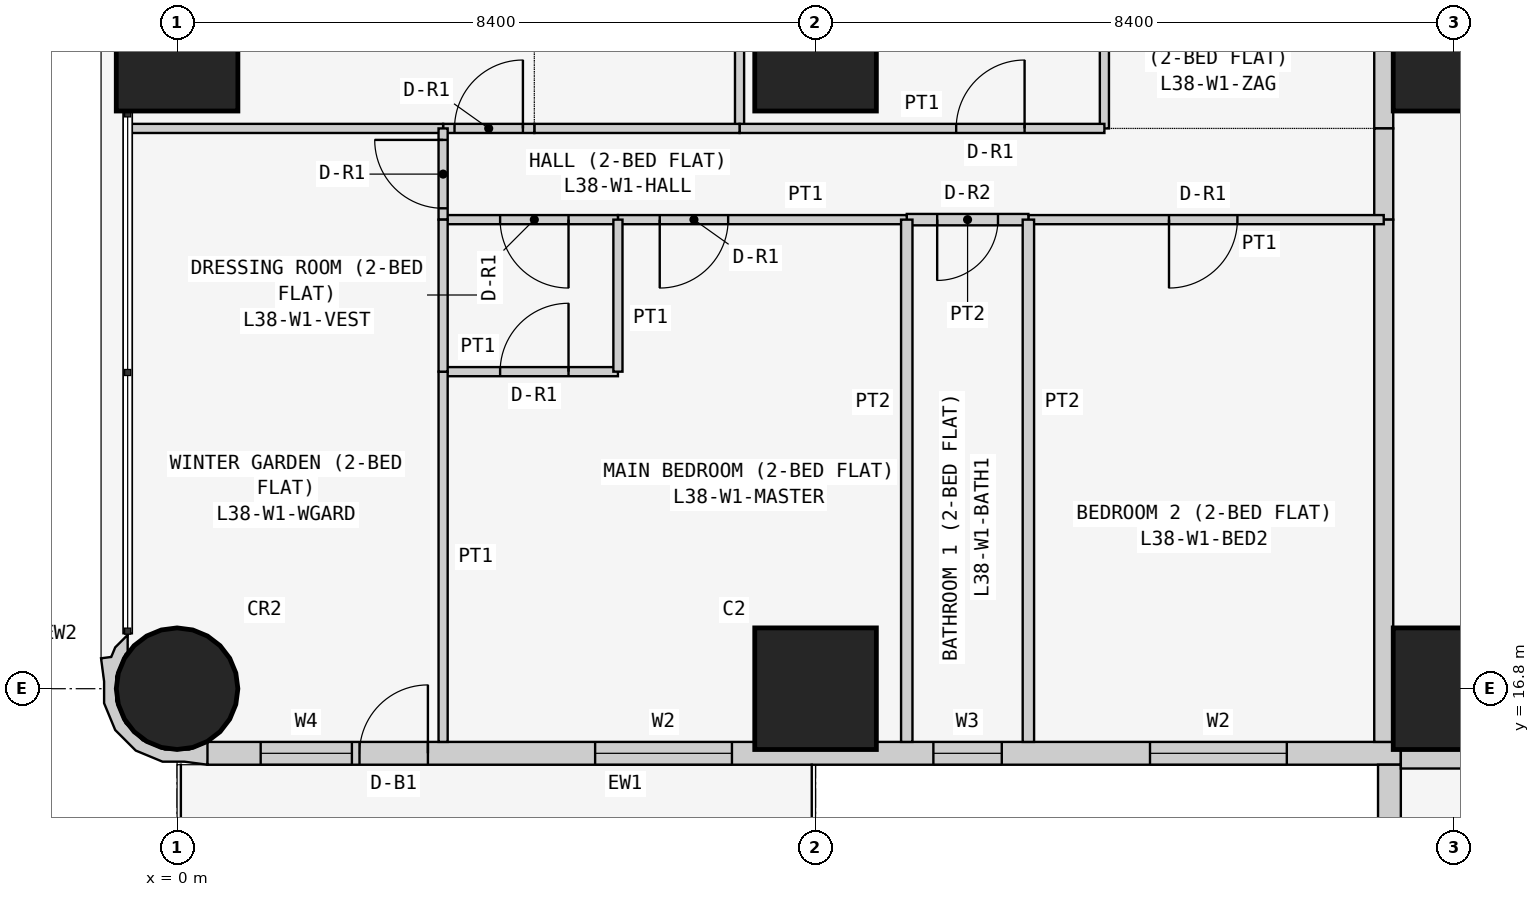
"""IFC4 building model, lengths in metres.
Left out: names, types, materials, properties, quantities, classifications, styles, units other than length and angle.
Written with IfcOpenShell. Run it as: python <this file> out.ifc"""

import sys

from ifc_helpers import new_model, si_unit, direction, frame, frame_2d, origin, origin_2d, place, context, subcontext, project, spatial, polyline, rectangle, circle, outline, extrude, element, fill, save


model = new_model("IFC4")
c1 = context("Model", 3, precision=1e-05, world=origin(), true_north=direction((0.0, 1.0)))
c2 = subcontext(c1, "Body", "Model", "MODEL_VIEW")
j1 = project(units=[si_unit("LENGTHUNIT", "METRE"), si_unit("PLANEANGLEUNIT", "RADIAN")], contexts=[c1])
p1 = place(None, origin())
s1 = spatial("IfcSite", under=j1, at=p1, CompositionType="ELEMENT")
p2 = place(p1, origin())
s2 = spatial("IfcBuilding", under=s1, at=p2, CompositionType="ELEMENT")
p3 = place(p2, frame((0.0, 0.0, 148.5)))
s3 = spatial("IfcBuildingStorey", under=s2, at=p3, CompositionType="ELEMENT", Elevation=148.5)
p4 = place(p3, frame((0.0, 16.8, 0.0), z_axis=(0.0, 0.0, 1.0), x_axis=(1.0, 0.0, 0.0)))
e1 = element("IfcColumn", 1, at=p4, inside=s3, PredefinedType="COLUMN", context=c2, shape_type="SweptSolid", body=[
    extrude(circle(Radius=0.8, at=origin_2d()), origin(), (0.0, 0.0, 1.0), 3.6),
])
for number, where, z_axis, x_axis in (
    (2, (0.0, 25.2, 0.0), (0.0, 0.0, 1.0), (1.0, 0.0, 0.0)),
    (3, (8.4, 16.8, 0.0), (0.0, 0.0, 1.0), (1.0, 0.0, 0.0)),
    (4, (8.4, 25.2, 0.0), (0.0, 0.0, 1.0), (1.0, 0.0, 0.0)),
    (5, (16.8, 16.8, 0.0), (0.0, 0.0, 1.0), (1.0, 0.0, 0.0)),
    (6, (16.8, 25.2, 0.0), (0.0, 0.0, 1.0), (1.0, 0.0, 0.0)),
):
    element("IfcColumn", number, at=place(p3, frame(where, z_axis=z_axis, x_axis=x_axis)), inside=s3, PredefinedType="COLUMN", context=c2, shape_type="SweptSolid", body=[
        extrude(rectangle(XDim=1.6, YDim=1.6, at=origin_2d()), origin(), (0.0, 0.0, 1.0), 3.6),
    ])
p5 = place(p3, frame((0.4, 15.95, 0.0), z_axis=(0.0, 0.0, 1.0), x_axis=(1.0, 0.0, 0.0)))
e7 = element("IfcWall", 7, at=p5, inside=s3, PredefinedType="SOLIDWALL", context=c2, shape_type="SweptSolid", body=[
    extrude(rectangle(XDim=15.7, YDim=0.3, at=frame_2d((7.85, 0.0))), origin(), (0.0, 0.0, 1.0), 3.45),
])
p6 = place(p5, frame((12.4, 0.0, 0.9)))
e8 = element("IfcOpeningElement", 8, at=p6, cuts=e7, PredefinedType="OPENING", context=c2, shape_type="SweptSolid", body=[
    extrude(rectangle(XDim=1.8, YDim=1.5, at=frame_2d((0.9, 0.75))), frame((0.0, 0.16, 0.0), z_axis=(0.0, -1.0, 0.0), x_axis=(1.0, 0.0, 0.0)), (0.0, 0.0, 1.0), 0.32),
])
p7 = place(p5, frame((9.55, 0.0, 1.5)))
e9 = element("IfcOpeningElement", 9, at=p7, cuts=e7, PredefinedType="OPENING", context=c2, shape_type="SweptSolid", body=[
    extrude(rectangle(XDim=0.9, YDim=0.7, at=frame_2d((0.45, 0.35))), frame((0.0, 0.16, 0.0), z_axis=(0.0, -1.0, 0.0), x_axis=(1.0, 0.0, 0.0)), (0.0, 0.0, 1.0), 0.32),
])
p8 = place(p5, frame((5.1, 0.0, 0.9)))
e10 = element("IfcOpeningElement", 10, at=p8, cuts=e7, PredefinedType="OPENING", context=c2, shape_type="SweptSolid", body=[
    extrude(rectangle(XDim=1.8, YDim=1.5, at=frame_2d((0.9, 0.75))), frame((0.0, 0.16, 0.0), z_axis=(0.0, -1.0, 0.0), x_axis=(1.0, 0.0, 0.0)), (0.0, 0.0, 1.0), 0.32),
])
p9 = place(p5, frame((2.0, 0.0, 0.0)))
e11 = element("IfcOpeningElement", 11, at=p9, cuts=e7, PredefinedType="OPENING", context=c2, shape_type="SweptSolid", body=[
    extrude(rectangle(XDim=0.9, YDim=2.4, at=frame_2d((0.45, 1.2))), frame((0.0, 0.16, 0.0), z_axis=(0.0, -1.0, 0.0), x_axis=(1.0, 0.0, 0.0)), (0.0, 0.0, 1.0), 0.32),
])
p10 = place(p5, frame((0.7, 0.0, 0.9)))
e12 = element("IfcOpeningElement", 12, at=p10, cuts=e7, PredefinedType="OPENING", context=c2, shape_type="SweptSolid", body=[
    extrude(rectangle(XDim=1.2, YDim=1.5, at=frame_2d((0.6, 0.75))), frame((0.0, 0.16, 0.0), z_axis=(0.0, -1.0, 0.0), x_axis=(1.0, 0.0, 0.0)), (0.0, 0.0, 1.0), 0.32),
])
p11 = place(p3, frame((15.95, 15.8, 0.0), z_axis=(0.0, 0.0, 1.0), x_axis=(0.0, -1.0, 0.0)))
e13 = element("IfcWall", 13, at=p11, inside=s3, PredefinedType="SOLIDWALL", context=c2, shape_type="SweptSolid", body=[
    extrude(rectangle(XDim=7.0, YDim=0.3, at=frame_2d((3.5, 0.0))), origin(), (0.0, 0.0, 1.0), 3.45),
])
p12 = place(p11, frame((1.5, 0.0, 0.9)))
e14 = element("IfcOpeningElement", 14, at=p12, cuts=e13, PredefinedType="OPENING", context=c2, shape_type="SweptSolid", body=[
    extrude(rectangle(XDim=2.4, YDim=1.5, at=frame_2d((1.2, 0.75))), frame((0.0, 0.16, 0.0), z_axis=(0.0, -1.0, 0.0), x_axis=(1.0, 0.0, 0.0)), (0.0, 0.0, 1.0), 0.32),
])
p13 = place(p11, frame((5.05, 0.0, 0.9)))
e15 = element("IfcOpeningElement", 15, at=p13, cuts=e13, PredefinedType="OPENING", context=c2, shape_type="SweptSolid", body=[
    extrude(rectangle(XDim=1.2, YDim=1.5, at=frame_2d((0.6, 0.75))), frame((0.0, 0.16, 0.0), z_axis=(0.0, -1.0, 0.0), x_axis=(1.0, 0.0, 0.0)), (0.0, 0.0, 1.0), 0.32),
])
p14 = place(p3, frame((-0.595, 17.448, 0.0), z_axis=(0.0, 0.0, 1.0), x_axis=(-0.93923434088, -0.343276641956, 0.0)))
e16 = element("IfcWall", 16, at=p14, inside=s3, PredefinedType="SOLIDWALL", context=c2, shape_type="SweptSolid", body=[
    extrude(outline(polyline([(-0.369, 1.89), (-0.509, 1.621), (-0.491, 1.614), (-0.479, 1.609), (-0.211, 1.62), (0.088, 1.511), (0.323, 1.295), (0.457, 1.006), (0.47, 0.688), (0.361, 0.389), (0.146, 0.154), (0.108, 0.137), (0.031, -0.075), (0.241, 0.023), (0.334, 0.124), (0.465, 0.094), (0.532, 0.393), (0.631, 0.663), (0.614, 1.045), (0.453, 1.391), (0.172, 1.649), (-0.098, 1.748), (-0.369, 1.89)])), origin(), (0.0, 0.0, 1.0), 3.45),
])
p15 = place(p3, frame((22.971, 15.875, 0.0), z_axis=(0.0, 0.0, 1.0), x_axis=(-1.0, 0.0, 0.0)))
e17 = element("IfcWall", 17, at=p15, inside=s3, PredefinedType="PARTITIONING", context=c2, shape_type="SweptSolid", body=[
    extrude(rectangle(XDim=6.871, YDim=0.25, at=frame_2d((3.436, 0.0))), origin(), (0.0, 0.0, 1.0), 3.45),
])
p16 = place(p3, frame((15.875, 24.171, 0.0), z_axis=(0.0, 0.0, 1.0), x_axis=(0.0, 1.0, 0.0)))
e18 = element("IfcWall", 18, at=p16, inside=s3, PredefinedType="PARTITIONING", context=c2, shape_type="SweptSolid", body=[
    extrude(rectangle(XDim=5.229, YDim=0.25, at=frame_2d((2.615, 0.0))), origin(), (0.0, 0.0, 1.0), 3.45),
])
p17 = place(p16, frame((2.129, 0.0, 0.0)))
e19 = element("IfcOpeningElement", 19, at=p17, cuts=e18, PredefinedType="OPENING", context=c2, shape_type="SweptSolid", body=[
    extrude(rectangle(XDim=1.0, YDim=2.1, at=frame_2d((0.5, 1.05))), frame((0.0, 0.135, 0.0), z_axis=(0.0, -1.0, 0.0), x_axis=(1.0, 0.0, 0.0)), (0.0, 0.0, 1.0), 0.27),
])
p18 = place(p3, frame((15.875, 22.971, 0.0), z_axis=(0.0, 0.0, 1.0), x_axis=(0.0, 1.0, 0.0)))
e20 = element("IfcWall", 20, at=p18, inside=s3, PredefinedType="PARTITIONING", context=c2, shape_type="SweptSolid", body=[
    extrude(rectangle(XDim=1.2, YDim=0.25, at=frame_2d((0.6, 0.0))), origin(), (0.0, 0.0, 1.0), 3.45),
])
p19 = place(p3, frame((15.875, 16.1, 0.0), z_axis=(0.0, 0.0, 1.0), x_axis=(0.0, 1.0, 0.0)))
e21 = element("IfcWall", 21, at=p19, inside=s3, PredefinedType="PARTITIONING", context=c2, shape_type="SweptSolid", body=[
    extrude(rectangle(XDim=6.871, YDim=0.25, at=frame_2d((3.436, 0.0))), origin(), (0.0, 0.0, 1.0), 3.45),
])
for number, where, z_axis, x_axis in (
    (22, (12.2, 29.4, 0.0), (0.0, 0.0, 1.0), (0.0, -1.0, 0.0)),
    (23, (7.4, 29.4, 0.0), (0.0, 0.0, 1.0), (0.0, -1.0, 0.0)),
):
    element("IfcWall", number, at=place(p3, frame(where, z_axis=z_axis, x_axis=x_axis)), inside=s3, PredefinedType="PARTITIONING", context=c2, shape_type="SweptSolid", body=[
        extrude(rectangle(XDim=5.229, YDim=0.12, at=frame_2d((2.615, 0.0))), origin(), (0.0, 0.0, 1.0), 3.45),
    ])
p20 = place(p3, frame((7.4, 24.171, 0.0), z_axis=(0.0, 0.0, 1.0), x_axis=(1.0, 0.0, 0.0)))
e24 = element("IfcWall", 24, at=p20, inside=s3, PredefinedType="PARTITIONING", context=c2, shape_type="SweptSolid", body=[
    extrude(rectangle(XDim=4.8, YDim=0.12, at=frame_2d((2.4, 0.0))), origin(), (0.0, 0.0, 1.0), 3.45),
])
p21 = place(p20, frame((2.85, 0.0, 0.0)))
e25 = element("IfcOpeningElement", 25, at=p21, cuts=e24, PredefinedType="OPENING", context=c2, shape_type="SweptSolid", body=[
    extrude(rectangle(XDim=0.9, YDim=2.1, at=frame_2d((0.45, 1.05))), frame((0.0, 0.07, 0.0), z_axis=(0.0, -1.0, 0.0), x_axis=(1.0, 0.0, 0.0)), (0.0, 0.0, 1.0), 0.14),
])
p22 = place(p3, frame((4.7, 24.171, 0.0), z_axis=(0.0, 0.0, 1.0), x_axis=(1.0, 0.0, 0.0)))
e26 = element("IfcWall", 26, at=p22, inside=s3, PredefinedType="PARTITIONING", context=c2, shape_type="SweptSolid", body=[
    extrude(rectangle(XDim=2.7, YDim=0.12, at=frame_2d((1.35, 0.0))), origin(), (0.0, 0.0, 1.0), 3.45),
])
p23 = place(p3, frame((3.5, 24.171, 0.0), z_axis=(0.0, 0.0, 1.0), x_axis=(1.0, 0.0, 0.0)))
e27 = element("IfcWall", 27, at=p23, inside=s3, PredefinedType="PARTITIONING", context=c2, shape_type="SweptSolid", body=[
    extrude(rectangle(XDim=1.2, YDim=0.12, at=frame_2d((0.6, 0.0))), origin(), (0.0, 0.0, 1.0), 3.45),
])
p24 = place(p23, frame((0.15, 0.0, 0.0)))
e28 = element("IfcOpeningElement", 28, at=p24, cuts=e27, PredefinedType="OPENING", context=c2, shape_type="SweptSolid", body=[
    extrude(rectangle(XDim=0.9, YDim=2.1, at=frame_2d((0.45, 1.05))), frame((0.0, 0.07, 0.0), z_axis=(0.0, -1.0, 0.0), x_axis=(1.0, 0.0, 0.0)), (0.0, 0.0, 1.0), 0.14),
])
p25 = place(p3, frame((-0.65, 24.171, 0.0), z_axis=(0.0, 0.0, 1.0), x_axis=(1.0, 0.0, 0.0)))
e29 = element("IfcWall", 29, at=p25, inside=s3, PredefinedType="PARTITIONING", context=c2, shape_type="SweptSolid", body=[
    extrude(rectangle(XDim=4.15, YDim=0.12, at=frame_2d((2.075, 0.0))), origin(), (0.0, 0.0, 1.0), 3.45),
])
p26 = place(p3, frame((11.2, 22.971, 0.0), z_axis=(0.0, 0.0, 1.0), x_axis=(1.0, 0.0, 0.0)))
e30 = element("IfcWall", 30, at=p26, inside=s3, PredefinedType="PARTITIONING", context=c2, shape_type="SweptSolid", body=[
    extrude(rectangle(XDim=4.675, YDim=0.12, at=frame_2d((2.337, 0.0))), origin(), (0.0, 0.0, 1.0), 3.45),
])
p27 = place(p26, frame((1.85, 0.0, 0.0)))
e31 = element("IfcOpeningElement", 31, at=p27, cuts=e30, PredefinedType="OPENING", context=c2, shape_type="SweptSolid", body=[
    extrude(rectangle(XDim=0.9, YDim=2.1, at=frame_2d((0.45, 1.05))), frame((0.0, 0.07, 0.0), z_axis=(0.0, -1.0, 0.0), x_axis=(1.0, 0.0, 0.0)), (0.0, 0.0, 1.0), 0.14),
])
p28 = place(p3, frame((9.6, 22.971, 0.0), z_axis=(0.0, 0.0, 1.0), x_axis=(1.0, 0.0, 0.0)))
e32 = element("IfcWall", 32, at=p28, inside=s3, PredefinedType="PARTITIONING", context=c2, shape_type="SweptSolid", body=[
    extrude(rectangle(XDim=1.6, YDim=0.15, at=frame_2d((0.8, 0.0))), origin(), (0.0, 0.0, 1.0), 3.45),
])
p29 = place(p28, frame((0.4, 0.0, 0.0)))
e33 = element("IfcOpeningElement", 33, at=p29, cuts=e32, PredefinedType="OPENING", context=c2, shape_type="SweptSolid", body=[
    extrude(rectangle(XDim=0.8, YDim=2.1, at=frame_2d((0.4, 1.05))), frame((0.0, 0.085, 0.0), z_axis=(0.0, -1.0, 0.0), x_axis=(1.0, 0.0, 0.0)), (0.0, 0.0, 1.0), 0.17),
])
p30 = place(p3, frame((5.8, 22.971, 0.0), z_axis=(0.0, 0.0, 1.0), x_axis=(1.0, 0.0, 0.0)))
e34 = element("IfcWall", 34, at=p30, inside=s3, PredefinedType="PARTITIONING", context=c2, shape_type="SweptSolid", body=[
    extrude(rectangle(XDim=3.8, YDim=0.12, at=frame_2d((1.9, 0.0))), origin(), (0.0, 0.0, 1.0), 3.45),
])
p31 = place(p30, frame((0.55, 0.0, 0.0)))
e35 = element("IfcOpeningElement", 35, at=p31, cuts=e34, PredefinedType="OPENING", context=c2, shape_type="SweptSolid", body=[
    extrude(rectangle(XDim=0.9, YDim=2.1, at=frame_2d((0.45, 1.05))), frame((0.0, 0.07, 0.0), z_axis=(0.0, -1.0, 0.0), x_axis=(1.0, 0.0, 0.0)), (0.0, 0.0, 1.0), 0.14),
])
p32 = place(p3, frame((3.5, 22.971, 0.0), z_axis=(0.0, 0.0, 1.0), x_axis=(1.0, 0.0, 0.0)))
e36 = element("IfcWall", 36, at=p32, inside=s3, PredefinedType="PARTITIONING", context=c2, shape_type="SweptSolid", body=[
    extrude(rectangle(XDim=2.3, YDim=0.12, at=frame_2d((1.15, 0.0))), origin(), (0.0, 0.0, 1.0), 3.45),
])
p33 = place(p32, frame((0.75, 0.0, 0.0)))
e37 = element("IfcOpeningElement", 37, at=p33, cuts=e36, PredefinedType="OPENING", context=c2, shape_type="SweptSolid", body=[
    extrude(rectangle(XDim=0.9, YDim=2.1, at=frame_2d((0.45, 1.05))), frame((0.0, 0.07, 0.0), z_axis=(0.0, -1.0, 0.0), x_axis=(1.0, 0.0, 0.0)), (0.0, 0.0, 1.0), 0.14),
])
p34 = place(p3, frame((3.5, 24.171, 0.0), z_axis=(0.0, 0.0, 1.0), x_axis=(0.0, -1.0, 0.0)))
e38 = element("IfcWall", 38, at=p34, inside=s3, PredefinedType="PARTITIONING", context=c2, shape_type="SweptSolid", body=[
    extrude(rectangle(XDim=1.2, YDim=0.12, at=frame_2d((0.6, 0.0))), origin(), (0.0, 0.0, 1.0), 3.45),
])
p35 = place(p34, frame((0.151, 0.0, 0.0)))
e39 = element("IfcOpeningElement", 39, at=p35, cuts=e38, PredefinedType="OPENING", context=c2, shape_type="SweptSolid", body=[
    extrude(rectangle(XDim=0.9, YDim=2.1, at=frame_2d((0.45, 1.05))), frame((0.0, 0.07, 0.0), z_axis=(0.0, -1.0, 0.0), x_axis=(1.0, 0.0, 0.0)), (0.0, 0.0, 1.0), 0.14),
])
for number, where, z_axis, x_axis in (
    (40, (11.2, 22.971, 0.0), (0.0, 0.0, 1.0), (0.0, -1.0, 0.0)),
    (41, (9.6, 22.971, 0.0), (0.0, 0.0, 1.0), (0.0, -1.0, 0.0)),
):
    element("IfcWall", number, at=place(p3, frame(where, z_axis=z_axis, x_axis=x_axis)), inside=s3, PredefinedType="PARTITIONING", context=c2, shape_type="SweptSolid", body=[
        extrude(rectangle(XDim=6.871, YDim=0.15, at=frame_2d((3.436, 0.0))), origin(), (0.0, 0.0, 1.0), 3.45),
    ])
p36 = place(p3, frame((3.5, 20.971, 0.0), z_axis=(0.0, 0.0, 1.0), x_axis=(1.0, 0.0, 0.0)))
e42 = element("IfcWall", 42, at=p36, inside=s3, PredefinedType="PARTITIONING", context=c2, shape_type="SweptSolid", body=[
    extrude(rectangle(XDim=2.3, YDim=0.12, at=frame_2d((1.15, 0.0))), origin(), (0.0, 0.0, 1.0), 3.45),
])
p37 = place(p36, frame((0.75, 0.0, 0.0)))
e43 = element("IfcOpeningElement", 43, at=p37, cuts=e42, PredefinedType="OPENING", context=c2, shape_type="SweptSolid", body=[
    extrude(rectangle(XDim=0.9, YDim=2.1, at=frame_2d((0.45, 1.05))), frame((0.0, 0.07, 0.0), z_axis=(0.0, -1.0, 0.0), x_axis=(1.0, 0.0, 0.0)), (0.0, 0.0, 1.0), 0.14),
])
p38 = place(p3, frame((5.8, 20.971, 0.0), z_axis=(0.0, 0.0, 1.0), x_axis=(0.0, 1.0, 0.0)))
e44 = element("IfcWall", 44, at=p38, inside=s3, PredefinedType="PARTITIONING", context=c2, shape_type="SweptSolid", body=[
    extrude(rectangle(XDim=2.0, YDim=0.12, at=frame_2d((1.0, 0.0))), origin(), (0.0, 0.0, 1.0), 3.45),
])
p39 = place(p3, frame((3.5, 16.1, 0.0), z_axis=(0.0, 0.0, 1.0), x_axis=(0.0, 1.0, 0.0)))
e45 = element("IfcWall", 45, at=p39, inside=s3, PredefinedType="PARTITIONING", context=c2, shape_type="SweptSolid", body=[
    extrude(rectangle(XDim=4.871, YDim=0.12, at=frame_2d((2.436, 0.0))), origin(), (0.0, 0.0, 1.0), 3.45),
])
p40 = place(p3, frame((3.5, 22.971, 0.0), z_axis=(0.0, 0.0, 1.0), x_axis=(0.0, -1.0, 0.0)))
e46 = element("IfcWall", 46, at=p40, inside=s3, PredefinedType="PARTITIONING", context=c2, shape_type="SweptSolid", body=[
    extrude(rectangle(XDim=2.0, YDim=0.12, at=frame_2d((1.0, 0.0))), origin(), (0.0, 0.0, 1.0), 3.45),
])
p41 = place(p6, origin())
e47 = element("IfcWindow", 47, at=p41, inside=s3, PartitioningType="SINGLE_PANEL", PredefinedType="WINDOW", context=c2, shape_type="SweptSolid", body=[
    extrude(rectangle(XDim=1.8, YDim=1.5, at=frame_2d((0.9, 0.75))), frame((0.0, 0.03, 0.0), z_axis=(0.0, -1.0, 0.0), x_axis=(1.0, 0.0, 0.0)), (0.0, 0.0, 1.0), 0.06),
])
fill(e8, e47)
p42 = place(p7, origin())
e48 = element("IfcWindow", 48, at=p42, inside=s3, PartitioningType="SINGLE_PANEL", PredefinedType="WINDOW", context=c2, shape_type="SweptSolid", body=[
    extrude(rectangle(XDim=0.9, YDim=0.7, at=frame_2d((0.45, 0.35))), frame((0.0, 0.03, 0.0), z_axis=(0.0, -1.0, 0.0), x_axis=(1.0, 0.0, 0.0)), (0.0, 0.0, 1.0), 0.06),
])
fill(e9, e48)
p43 = place(p8, origin())
e49 = element("IfcWindow", 49, at=p43, inside=s3, PartitioningType="SINGLE_PANEL", PredefinedType="WINDOW", context=c2, shape_type="SweptSolid", body=[
    extrude(rectangle(XDim=1.8, YDim=1.5, at=frame_2d((0.9, 0.75))), frame((0.0, 0.03, 0.0), z_axis=(0.0, -1.0, 0.0), x_axis=(1.0, 0.0, 0.0)), (0.0, 0.0, 1.0), 0.06),
])
fill(e10, e49)
p44 = place(p9, origin())
e50 = element("IfcDoor", 50, at=p44, inside=s3, OperationType="SINGLE_SWING_RIGHT", PredefinedType="DOOR", context=c2, shape_type="SweptSolid", body=[
    extrude(rectangle(XDim=0.9, YDim=2.4, at=frame_2d((0.45, 1.2))), frame((0.0, 0.025, 0.0), z_axis=(0.0, -1.0, 0.0), x_axis=(1.0, 0.0, 0.0)), (0.0, 0.0, 1.0), 0.05),
])
fill(e11, e50)
p45 = place(p10, origin())
e51 = element("IfcWindow", 51, at=p45, inside=s3, PartitioningType="SINGLE_PANEL", PredefinedType="WINDOW", context=c2, shape_type="SweptSolid", body=[
    extrude(rectangle(XDim=1.2, YDim=1.5, at=frame_2d((0.6, 0.75))), frame((0.0, 0.03, 0.0), z_axis=(0.0, -1.0, 0.0), x_axis=(1.0, 0.0, 0.0)), (0.0, 0.0, 1.0), 0.06),
])
fill(e12, e51)
p46 = place(p21, origin())
e52 = element("IfcDoor", 52, at=p46, inside=s3, OperationType="SINGLE_SWING_RIGHT", PredefinedType="DOOR", context=c2, shape_type="SweptSolid", body=[
    extrude(rectangle(XDim=0.9, YDim=2.1, at=frame_2d((0.45, 1.05))), frame((0.0, 0.025, 0.0), z_axis=(0.0, -1.0, 0.0), x_axis=(1.0, 0.0, 0.0)), (0.0, 0.0, 1.0), 0.05),
])
fill(e25, e52)
p47 = place(p24, origin())
e53 = element("IfcDoor", 53, at=p47, inside=s3, OperationType="SINGLE_SWING_RIGHT", PredefinedType="DOOR", context=c2, shape_type="SweptSolid", body=[
    extrude(rectangle(XDim=0.9, YDim=2.1, at=frame_2d((0.45, 1.05))), frame((0.0, 0.025, 0.0), z_axis=(0.0, -1.0, 0.0), x_axis=(1.0, 0.0, 0.0)), (0.0, 0.0, 1.0), 0.05),
])
fill(e28, e53)
p48 = place(p27, frame((0.9, 0.0, 0.0), z_axis=(0.0, 0.0, 1.0), x_axis=(-1.0, 0.0, 0.0)))
e54 = element("IfcDoor", 54, at=p48, inside=s3, OperationType="SINGLE_SWING_RIGHT", PredefinedType="DOOR", context=c2, shape_type="SweptSolid", body=[
    extrude(rectangle(XDim=0.9, YDim=2.1, at=frame_2d((0.45, 1.05))), frame((0.0, 0.025, 0.0), z_axis=(0.0, -1.0, 0.0), x_axis=(1.0, 0.0, 0.0)), (0.0, 0.0, 1.0), 0.05),
])
fill(e31, e54)
p49 = place(p29, frame((0.8, 0.0, 0.0), z_axis=(0.0, 0.0, 1.0), x_axis=(-1.0, 0.0, 0.0)))
e55 = element("IfcDoor", 55, at=p49, inside=s3, OperationType="SINGLE_SWING_RIGHT", PredefinedType="DOOR", context=c2, shape_type="SweptSolid", body=[
    extrude(rectangle(XDim=0.8, YDim=2.1, at=frame_2d((0.4, 1.05))), frame((0.0, 0.025, 0.0), z_axis=(0.0, -1.0, 0.0), x_axis=(1.0, 0.0, 0.0)), (0.0, 0.0, 1.0), 0.05),
])
fill(e33, e55)
p50 = place(p31, frame((0.9, 0.0, 0.0), z_axis=(0.0, 0.0, 1.0), x_axis=(-1.0, 0.0, 0.0)))
e56 = element("IfcDoor", 56, at=p50, inside=s3, OperationType="SINGLE_SWING_RIGHT", PredefinedType="DOOR", context=c2, shape_type="SweptSolid", body=[
    extrude(rectangle(XDim=0.9, YDim=2.1, at=frame_2d((0.45, 1.05))), frame((0.0, 0.025, 0.0), z_axis=(0.0, -1.0, 0.0), x_axis=(1.0, 0.0, 0.0)), (0.0, 0.0, 1.0), 0.05),
])
fill(e35, e56)
p51 = place(p33, frame((0.9, 0.0, 0.0), z_axis=(0.0, 0.0, 1.0), x_axis=(-1.0, 0.0, 0.0)))
e57 = element("IfcDoor", 57, at=p51, inside=s3, OperationType="SINGLE_SWING_LEFT", PredefinedType="DOOR", context=c2, shape_type="SweptSolid", body=[
    extrude(rectangle(XDim=0.9, YDim=2.1, at=frame_2d((0.45, 1.05))), frame((0.0, 0.025, 0.0), z_axis=(0.0, -1.0, 0.0), x_axis=(1.0, 0.0, 0.0)), (0.0, 0.0, 1.0), 0.05),
])
fill(e37, e57)
p52 = place(p37, origin())
e58 = element("IfcDoor", 58, at=p52, inside=s3, OperationType="SINGLE_SWING_RIGHT", PredefinedType="DOOR", context=c2, shape_type="SweptSolid", body=[
    extrude(rectangle(XDim=0.9, YDim=2.1, at=frame_2d((0.45, 1.05))), frame((0.0, 0.025, 0.0), z_axis=(0.0, -1.0, 0.0), x_axis=(1.0, 0.0, 0.0)), (0.0, 0.0, 1.0), 0.05),
])
fill(e43, e58)
p53 = place(p35, frame((0.9, 0.0, 0.0), z_axis=(0.0, 0.0, 1.0), x_axis=(-1.0, 0.0, 0.0)))
e59 = element("IfcDoor", 59, at=p53, inside=s3, OperationType="SINGLE_SWING_RIGHT", PredefinedType="DOOR", context=c2, shape_type="SweptSolid", body=[
    extrude(rectangle(XDim=0.9, YDim=2.1, at=frame_2d((0.45, 1.05))), frame((0.0, 0.025, 0.0), z_axis=(0.0, -1.0, 0.0), x_axis=(1.0, 0.0, 0.0)), (0.0, 0.0, 1.0), 0.05),
])
fill(e39, e59)
save(model, sys.argv[1])
